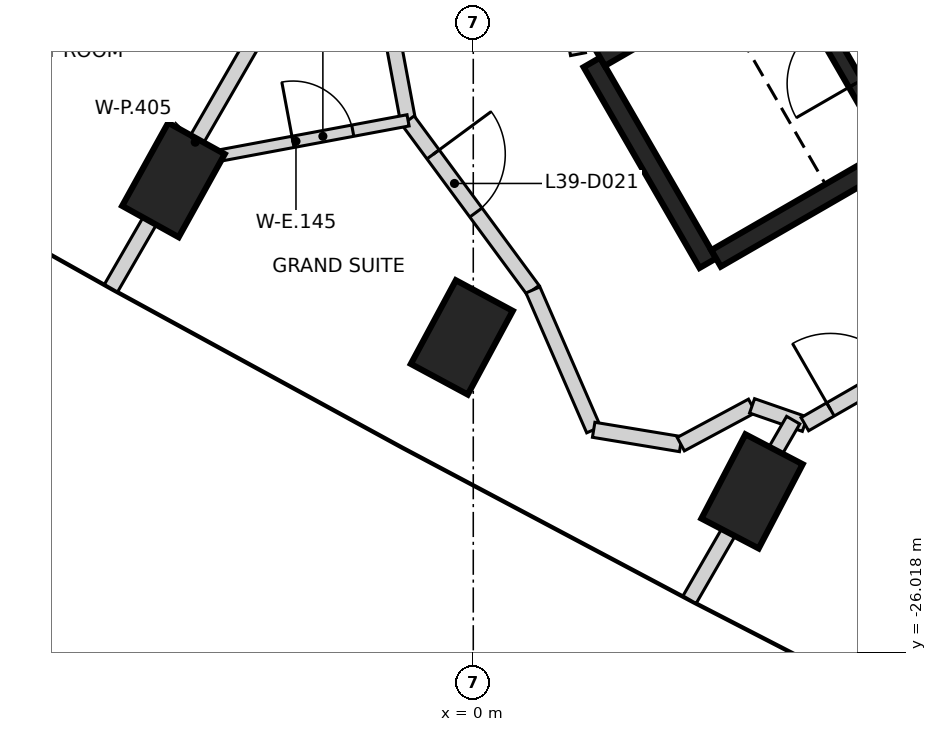
"""IFC4 building model, lengths in metres.
Left out: names, types, materials, properties, quantities, classifications, styles, units other than length and angle.
Written with IfcOpenShell. Run it as: python <this file> out.ifc"""

import sys

from ifc_helpers import new_model, si_unit, direction, frame, frame_2d, origin, origin_2d, place, context, subcontext, project, spatial, rectangle, extrude, element, fill, save


model = new_model("IFC4")
c1 = context("Model", 3, precision=1e-05, world=origin(), true_north=direction((0.0, 1.0)))
c2 = subcontext(c1, "Body", "Model", "MODEL_VIEW")
j1 = project(units=[si_unit("LENGTHUNIT", "METRE"), si_unit("PLANEANGLEUNIT", "RADIAN")], contexts=[c1])
p1 = place(None, origin())
s1 = spatial("IfcSite", under=j1, at=p1, CompositionType="ELEMENT")
p2 = place(p1, origin())
s2 = spatial("IfcBuilding", under=s1, at=p2, CompositionType="ELEMENT")
p3 = place(p2, frame((0.0, 0.0, 157.6)))
s3 = spatial("IfcBuildingStorey", under=s2, at=p3, CompositionType="ELEMENT", Elevation=157.6)
for number, where, z_axis, x_axis in (
    (1, (-3.945, -19.8, -0.4), (0.0, 0.0, 1.0), (0.485, 0.875, 0.0)),
    (2, (-0.151, -21.871, -0.4), (0.0, 0.0, 1.0), (0.474, 0.881, 0.0)),
    (3, (3.667, -23.896, -0.4), (0.0, 0.0, 1.0), (0.463, 0.886, 0.0)),
):
    element("IfcColumn", number, at=place(p3, frame(where, z_axis=z_axis, x_axis=x_axis)), inside=s3, PredefinedType="COLUMN", context=c2, shape_type="SweptSolid", body=[
        extrude(rectangle(XDim=1.25, YDim=0.85, at=origin_2d()), origin(), (0.0, 0.0, 1.0), 3.6),
    ])
p4 = place(p3, frame((3.085, -20.894, 0.0), z_axis=(0.0, 0.0, 1.0), x_axis=(-0.499978833458, 0.866037623948, 0.0)))
e4 = element("IfcWall", 4, at=p4, inside=s3, PredefinedType="SHEAR", context=c2, shape_type="SweptSolid", body=[
    extrude(rectangle(XDim=3.05, YDim=0.25, at=frame_2d((1.525, 0.0))), origin(), (0.0, 0.0, 1.0), 3.2),
])
p5 = place(p3, frame((1.669, -18.19, 0.0), z_axis=(0.0, 0.0, 1.0), x_axis=(0.866042235819, 0.499970844928, 0.0)))
e5 = element("IfcWall", 5, at=p5, inside=s3, PredefinedType="SHEAR", context=c2, shape_type="SweptSolid", body=[
    extrude(rectangle(XDim=2.865, YDim=0.25, at=frame_2d((1.432, 0.0))), origin(), (0.0, 0.0, 1.0), 3.2),
])
p6 = place(p3, frame((5.675, -19.399, 0.0), z_axis=(0.0, 0.0, 1.0), x_axis=(-0.866026637627, -0.499997862916, 0.0)))
e6 = element("IfcWall", 6, at=p6, inside=s3, PredefinedType="SHEAR", context=c2, shape_type="SweptSolid", body=[
    extrude(rectangle(XDim=2.865, YDim=0.25, at=frame_2d((1.432, 0.0))), origin(), (0.0, 0.0, 1.0), 3.2),
])
p7 = place(p3, frame((4.414, -16.276, 0.0), z_axis=(0.0, 0.0, 1.0), x_axis=(0.500003324108, -0.866023484601, 0.0)))
e7 = element("IfcWall", 7, at=p7, inside=s3, PredefinedType="SHEAR", context=c2, shape_type="SweptSolid", body=[
    extrude(rectangle(XDim=3.085, YDim=0.25, at=frame_2d((1.542, 0.0))), origin(), (0.0, 0.0, 1.0), 3.2),
])
p8 = place(p3, frame((5.503, -19.352, 0.0), z_axis=(0.0, 0.0, 1.0), x_axis=(-0.499986818241, 0.866033014143, 0.0)))
e8 = element("IfcWall", 8, at=p8, inside=s3, PredefinedType="SHEAR", context=c2, shape_type="SweptSolid", body=[
    extrude(rectangle(XDim=2.798, YDim=0.2, at=frame_2d((1.399, 0.0))), origin(), (0.0, 0.0, 1.0), 3.2),
])
p9 = place(p8, frame((0.949, 0.0, 0.0)))
e9 = element("IfcOpeningElement", 9, at=p9, cuts=e8, PredefinedType="OPENING", context=c2, shape_type="SweptSolid", body=[
    extrude(rectangle(XDim=0.9, YDim=2.1, at=frame_2d((0.45, 1.05))), frame((0.0, 0.11, 0.0), z_axis=(0.0, -1.0, 0.0), x_axis=(1.0, 0.0, 0.0)), (0.0, 0.0, 1.0), 0.22),
])
p10 = place(p3, frame((-1.212, -17.131, 0.0), z_axis=(0.0, 0.0, 1.0), x_axis=(0.183680924698, -0.982985919483, 0.0)))
e10 = element("IfcWall", 10, at=p10, inside=s3, PredefinedType="PARTITIONING", context=c2, shape_type="SweptSolid", body=[
    extrude(rectangle(XDim=1.917, YDim=0.2, at=frame_2d((0.958, 0.0))), origin(), (0.0, 0.0, 1.0), 3.2),
])
p11 = place(p3, frame((-0.858, -19.016, 0.0), z_axis=(0.0, 0.0, 1.0), x_axis=(0.593123867414, -0.805111220829, 0.0)))
e11 = element("IfcWall", 11, at=p11, inside=s3, PredefinedType="PARTITIONING", context=c2, shape_type="SweptSolid", body=[
    extrude(rectangle(XDim=2.77, YDim=0.2, at=frame_2d((1.385, 0.0))), origin(), (0.0, 0.0, 1.0), 3.2),
])
p12 = place(p11, frame((0.555, 0.0, 0.0)))
e12 = element("IfcOpeningElement", 12, at=p12, cuts=e11, PredefinedType="OPENING", context=c2, shape_type="SweptSolid", body=[
    extrude(rectangle(XDim=0.95, YDim=2.1, at=frame_2d((0.475, 1.05))), frame((0.0, 0.11, 0.0), z_axis=(0.0, -1.0, 0.0), x_axis=(1.0, 0.0, 0.0)), (0.0, 0.0, 1.0), 0.22),
])
p13 = place(p3, frame((0.289, -12.445, 0.0), z_axis=(0.0, 0.0, 1.0), x_axis=(0.187668946952, -0.982232338273, 0.0)))
e13 = element("IfcWall", 13, at=p13, inside=s3, PredefinedType="PARTITIONING", context=c2, shape_type="SweptSolid", body=[
    extrude(rectangle(XDim=5.802, YDim=0.2, at=frame_2d((2.901, 0.0))), origin(), (0.0, 0.0, 1.0), 3.2),
])
p14 = place(p13, frame((2.433, 0.0, 0.0)))
e14 = element("IfcOpeningElement", 14, at=p14, cuts=e13, PredefinedType="OPENING", context=c2, shape_type="SweptSolid", body=[
    extrude(rectangle(XDim=1.0, YDim=2.1, at=frame_2d((0.5, 1.05))), frame((0.0, 0.11, 0.0), z_axis=(0.0, -1.0, 0.0), x_axis=(1.0, 0.0, 0.0)), (0.0, 0.0, 1.0), 0.22),
])
p15 = place(p3, frame((0.785, -21.246, 0.0), z_axis=(0.0, 0.0, 1.0), x_axis=(0.398365586627, -0.917226721913, 0.0)))
e15 = element("IfcWall", 15, at=p15, inside=s3, PredefinedType="PARTITIONING", context=c2, shape_type="SweptSolid", body=[
    extrude(rectangle(XDim=2.006, YDim=0.2, at=frame_2d((1.003, 0.0))), origin(), (0.0, 0.0, 1.0), 2.3),
])
p16 = place(p3, frame((1.584, -23.086, 0.0), z_axis=(0.0, 0.0, 1.0), x_axis=(0.986654221629, -0.162829502674, 0.0)))
e16 = element("IfcWall", 16, at=p16, inside=s3, PredefinedType="PARTITIONING", context=c2, shape_type="SweptSolid", body=[
    extrude(rectangle(XDim=1.16, YDim=0.2, at=frame_2d((0.58, 0.0))), origin(), (0.0, 0.0, 1.0), 2.3),
])
p17 = place(p3, frame((2.73, -23.275, 0.0), z_axis=(0.0, 0.0, 1.0), x_axis=(0.880927165636, 0.473251866182, 0.0)))
e17 = element("IfcWall", 17, at=p17, inside=s3, PredefinedType="PARTITIONING", context=c2, shape_type="SweptSolid", body=[
    extrude(rectangle(XDim=1.065, YDim=0.2, at=frame_2d((0.532, 0.0))), origin(), (0.0, 0.0, 1.0), 3.2),
])
p18 = place(p3, frame((3.668, -22.771, 0.0), z_axis=(0.0, 0.0, 1.0), x_axis=(0.944447470761, -0.328662402738, 0.0)))
e18 = element("IfcWall", 18, at=p18, inside=s3, PredefinedType="PARTITIONING", context=c2, shape_type="SweptSolid", body=[
    extrude(rectangle(XDim=0.735, YDim=0.2, at=frame_2d((0.367, 0.0))), origin(), (0.0, 0.0, 1.0), 3.2),
])
p19 = place(p3, frame((4.362, -23.012, 0.0), z_axis=(0.0, 0.0, 1.0), x_axis=(0.866692617793, 0.49884256661, 0.0)))
e19 = element("IfcWall", 19, at=p19, inside=s3, PredefinedType="PARTITIONING", context=c2, shape_type="SweptSolid", body=[
    extrude(rectangle(XDim=1.778, YDim=0.2, at=frame_2d((0.889, 0.0))), origin(), (0.0, 0.0, 1.0), 3.2),
])
p20 = place(p19, frame((0.389, 0.0, 0.0)))
e20 = element("IfcOpeningElement", 20, at=p20, cuts=e19, PredefinedType="OPENING", context=c2, shape_type="SweptSolid", body=[
    extrude(rectangle(XDim=1.0, YDim=2.1, at=frame_2d((0.5, 1.05))), frame((0.0, 0.11, 0.0), z_axis=(0.0, -1.0, 0.0), x_axis=(1.0, 0.0, 0.0)), (0.0, 0.0, 1.0), 0.22),
])
p21 = place(p3, frame((-8.535, -19.107, 0.0), z_axis=(0.0, 0.0, 1.0), x_axis=(0.499987057201, 0.866032876184, 0.0)))
e21 = element("IfcWall", 21, at=p21, inside=s3, PredefinedType="PARTITIONING", context=c2, shape_type="SweptSolid", body=[
    extrude(rectangle(XDim=10.809, YDim=0.2, at=frame_2d((5.404, 0.0))), origin(), (0.0, 0.0, 1.0), 3.2),
])
p22 = place(p3, frame((-4.767, -21.223, 0.0), z_axis=(0.0, 0.0, 1.0), x_axis=(0.49992092869, 0.866071050814, 0.0)))
e22 = element("IfcWall", 22, at=p22, inside=s3, PredefinedType="PARTITIONING", context=c2, shape_type="SweptSolid", body=[
    extrude(rectangle(XDim=4.437, YDim=0.2, at=frame_2d((2.218, 0.0))), origin(), (0.0, 0.0, 1.0), 3.2),
])
p23 = place(p3, frame((2.845, -25.321, 0.0), z_axis=(0.0, 0.0, 1.0), x_axis=(0.499942002849, 0.866058885866, 0.0)))
e23 = element("IfcWall", 23, at=p23, inside=s3, PredefinedType="PARTITIONING", context=c2, shape_type="SweptSolid", body=[
    extrude(rectangle(XDim=2.727, YDim=0.2, at=frame_2d((1.364, 0.0))), origin(), (0.0, 0.0, 1.0), 3.2),
])
p24 = place(p3, frame((-3.807, -19.566, 0.0), z_axis=(0.0, 0.0, 1.0), x_axis=(0.982987155193, 0.183674311555, 0.0)))
e24 = element("IfcWall", 24, at=p24, inside=s3, PredefinedType="PARTITIONING", context=c2, shape_type="SweptSolid", body=[
    extrude(rectangle(XDim=3.0, YDim=0.15, at=frame_2d((1.5, 0.0))), origin(), (0.0, 0.0, 1.0), 3.2),
])
p25 = place(p24, frame((1.46, 0.0, 0.0)))
e25 = element("IfcOpeningElement", 25, at=p25, cuts=e24, PredefinedType="OPENING", context=c2, shape_type="SweptSolid", body=[
    extrude(rectangle(XDim=0.8, YDim=2.1, at=frame_2d((0.4, 1.05))), frame((0.0, 0.085, 0.0), z_axis=(0.0, -1.0, 0.0), x_axis=(1.0, 0.0, 0.0)), (0.0, 0.0, 1.0), 0.17),
])
p26 = place(p9, origin())
e26 = element("IfcDoor", 26, at=p26, inside=s3, OperationType="SINGLE_SWING_LEFT", PredefinedType="DOOR", context=c2, shape_type="SweptSolid", body=[
    extrude(rectangle(XDim=0.9, YDim=2.1, at=frame_2d((0.45, 1.05))), frame((0.0, 0.025, 0.0), z_axis=(0.0, -1.0, 0.0), x_axis=(1.0, 0.0, 0.0)), (0.0, 0.0, 1.0), 0.05),
])
fill(e9, e26)
p27 = place(p12, frame((0.95, 0.0, 0.0), z_axis=(0.0, 0.0, 1.0), x_axis=(-1.0, 0.0, 0.0)))
e27 = element("IfcDoor", 27, at=p27, inside=s3, OperationType="SINGLE_SWING_LEFT", PredefinedType="DOOR", context=c2, shape_type="SweptSolid", body=[
    extrude(rectangle(XDim=0.95, YDim=2.1, at=frame_2d((0.475, 1.05))), frame((0.0, 0.025, 0.0), z_axis=(0.0, -1.0, 0.0), x_axis=(1.0, 0.0, 0.0)), (0.0, 0.0, 1.0), 0.05),
])
fill(e12, e27)
p28 = place(p25, frame((0.8, 0.0, 0.0), z_axis=(0.0, 0.0, 1.0), x_axis=(-1.0, 0.0, 0.0)))
e28 = element("IfcDoor", 28, at=p28, inside=s3, OperationType="SINGLE_SWING_LEFT", PredefinedType="DOOR", context=c2, shape_type="SweptSolid", body=[
    extrude(rectangle(XDim=0.8, YDim=2.1, at=frame_2d((0.4, 1.05))), frame((0.0, 0.025, 0.0), z_axis=(0.0, -1.0, 0.0), x_axis=(1.0, 0.0, 0.0)), (0.0, 0.0, 1.0), 0.05),
])
fill(e25, e28)
p29 = place(p20, frame((1.0, 0.0, 0.0), z_axis=(0.0, 0.0, 1.0), x_axis=(-1.0, 0.0, 0.0)))
e29 = element("IfcDoor", 29, at=p29, inside=s3, OperationType="SINGLE_SWING_LEFT", PredefinedType="DOOR", context=c2, shape_type="SweptSolid", body=[
    extrude(rectangle(XDim=1.0, YDim=2.1, at=frame_2d((0.5, 1.05))), frame((0.0, 0.025, 0.0), z_axis=(0.0, -1.0, 0.0), x_axis=(1.0, 0.0, 0.0)), (0.0, 0.0, 1.0), 0.05),
])
fill(e20, e29)
save(model, sys.argv[1])
